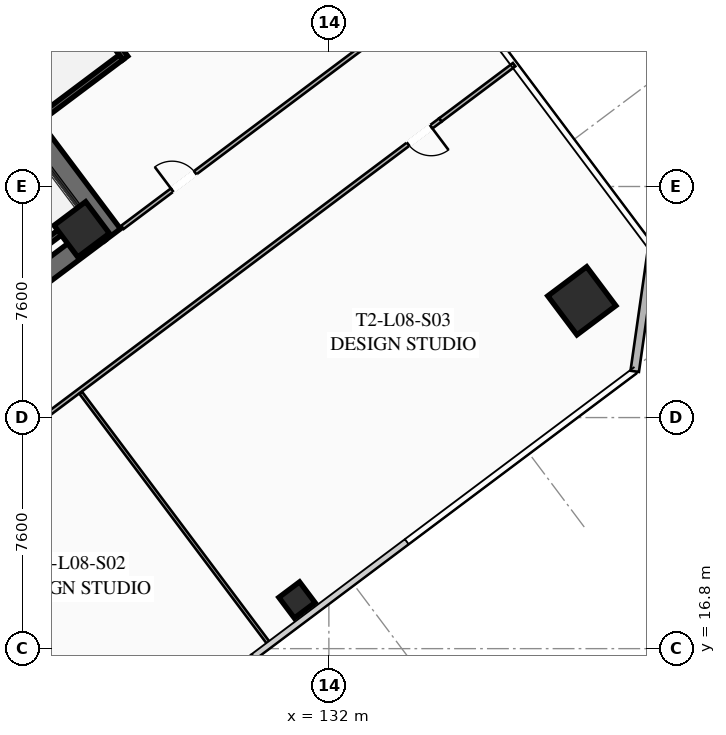
"""IFC4 building model, lengths in metres.
Left out: names, types, materials, properties, quantities, classifications, styles, units other than length and angle.
Written with IfcOpenShell. Run it as: python <this file> out.ifc"""

import sys

from ifc_helpers import new_model, si_unit, direction, frame, frame_2d, origin, origin_2d, place, context, subcontext, project, spatial, rectangle, hollow_rectangle, extrude, element, fill, save


model = new_model("IFC4")
c1 = context("Model", 3, precision=1e-05, world=origin(), true_north=direction((0.0, 1.0)))
c2 = subcontext(c1, "Body", "Model", "MODEL_VIEW")
j1 = project(units=[si_unit("LENGTHUNIT", "METRE"), si_unit("PLANEANGLEUNIT", "RADIAN")], contexts=[c1])
p1 = place(None, origin())
s1 = spatial("IfcSite", under=j1, at=p1, CompositionType="ELEMENT")
p2 = place(p1, origin())
s2 = spatial("IfcBuilding", under=s1, at=p2, CompositionType="ELEMENT")
p3 = place(p2, frame((0.0, 0.0, 35.25)))
s3 = spatial("IfcBuildingStorey", under=s2, at=p3, CompositionType="ELEMENT", Elevation=35.25)
p4 = place(p3, frame((115.524, 42.893, 0.0), z_axis=(0.0, 0.0, 1.0), x_axis=(0.600005007985, -0.799996243986, 0.0)))
e1 = element("IfcWall", 1, at=p4, inside=s3, PredefinedType="SHEAR", context=c2, shape_type="SweptSolid", body=[
    extrude(rectangle(XDim=15.6, YDim=0.65, at=frame_2d((7.8, 0.0))), origin(), (0.0, 0.0, 1.0), 3.55),
])
p5 = place(p3, frame((124.429, 30.478, 0.0), z_axis=(0.0, 0.0, 1.0), x_axis=(-0.799998028465, -0.600002628705, 0.0)))
e2 = element("IfcWall", 2, at=p5, inside=s3, PredefinedType="SHEAR", context=c2, shape_type="SweptSolid", body=[
    extrude(rectangle(XDim=14.86, YDim=0.65, at=frame_2d((7.43, 0.0))), origin(), (0.0, 0.0, 1.0), 3.55),
])
p6 = place(p5, frame((9.13, 0.0, 0.0)))
e3 = element("IfcOpeningElement", 3, at=p6, cuts=e2, PredefinedType="OPENING", context=c2, shape_type="SweptSolid", body=[
    extrude(rectangle(XDim=1.25, YDim=2.25, at=frame_2d((0.625, 1.125))), frame((0.0, 0.335, 0.0), z_axis=(0.0, -1.0, 0.0), x_axis=(1.0, 0.0, 0.0)), (0.0, 0.0, 1.0), 0.67),
])
p7 = place(p5, frame((4.08, 0.0, 0.0)))
e4 = element("IfcOpeningElement", 4, at=p7, cuts=e2, PredefinedType="OPENING", context=c2, shape_type="SweptSolid", body=[
    extrude(rectangle(XDim=1.25, YDim=2.25, at=frame_2d((0.625, 1.125))), frame((0.0, 0.335, 0.0), z_axis=(0.0, -1.0, 0.0), x_axis=(1.0, 0.0, 0.0)), (0.0, 0.0, 1.0), 0.67),
])
p8 = place(p3, frame((123.87, 30.59, 0.0), z_axis=(0.0, 0.0, 1.0), x_axis=(0.799999996291, 0.600000004945, 0.0)))
e5 = element("IfcColumn", 5, at=p8, inside=s3, PredefinedType="COLUMN", context=c2, shape_type="SweptSolid", body=[
    extrude(hollow_rectangle(XDim=1.3, YDim=1.3, WallThickness=0.05, at=origin_2d()), origin(), (0.0, 0.0, 1.0), 3.35),
])
p9 = place(p3, frame((140.32, 28.24, 0.0), z_axis=(0.0, 0.0, 1.0), x_axis=(0.799999996291, 0.600000004945, 0.0)))
e6 = element("IfcColumn", 6, at=p9, inside=s3, PredefinedType="COLUMN", context=c2, shape_type="SweptSolid", body=[
    extrude(hollow_rectangle(XDim=1.6, YDim=1.6, WallThickness=0.06, at=origin_2d()), origin(), (0.0, 0.0, 1.0), 3.35),
])
p10 = place(p3, frame((130.95, 18.4, 0.0), z_axis=(0.0, 0.0, 1.0), x_axis=(0.799999996291, 0.600000004945, 0.0)))
e7 = element("IfcColumn", 7, at=p10, inside=s3, PredefinedType="COLUMN", context=c2, shape_type="SweptSolid", body=[
    extrude(hollow_rectangle(XDim=0.85, YDim=0.85, WallThickness=0.035, at=origin_2d()), origin(), (0.0, 0.0, 1.0), 3.35),
])
p11 = place(p3, frame((142.64, 29.98, 0.0), z_axis=(0.0, 0.0, 1.0), x_axis=(-0.14137968631, -0.989955445613, 0.0)))
e8 = element("IfcWall", 8, at=p11, inside=s3, PredefinedType="SOLIDWALL", context=c2, shape_type="SweptSolid", body=[
    extrude(rectangle(XDim=4.101, YDim=0.28, at=frame_2d((2.051, 0.0))), origin(), (0.0, 0.0, 1.0), 3.35),
])
p12 = place(p3, frame((120.98, 28.86, 0.0), z_axis=(0.0, 0.0, 1.0), x_axis=(0.800039270442, 0.59994763584, 0.0)))
e9 = element("IfcWall", 9, at=p12, inside=s3, PredefinedType="SHEAR", context=c2, shape_type="SweptSolid", body=[
    extrude(rectangle(XDim=3.73, YDim=0.2, at=frame_2d((1.865, 0.0))), origin(), (0.0, 0.0, 1.0), 3.35),
])
p13 = place(p3, frame((125.304, 36.228, 0.0), z_axis=(0.0, 0.0, 1.0), x_axis=(-0.59998851072, 0.800008616831, 0.0)))
e10 = element("IfcWall", 10, at=p13, inside=s3, PredefinedType="SHEAR", context=c2, shape_type="SweptSolid", body=[
    extrude(rectangle(XDim=6.8, YDim=0.2, at=frame_2d((3.4, 0.0))), origin(), (0.0, 0.0, 1.0), 3.35),
])
p14 = place(p3, frame((122.444, 34.208, 0.0), z_axis=(0.0, 0.0, 1.0), x_axis=(0.79999138319, 0.600011488909, 0.0)))
e11 = element("IfcWall", 11, at=p14, inside=s3, PredefinedType="SHEAR", context=c2, shape_type="SweptSolid", body=[
    extrude(rectangle(XDim=3.4, YDim=0.2, at=frame_2d((1.7, 0.0))), origin(), (0.0, 0.0, 1.0), 3.35),
])
p15 = place(p3, frame((135.67, 34.19, 0.0), z_axis=(0.0, 0.0, 1.0), x_axis=(-0.800000982127, -0.599998690494, 0.0)))
e12 = element("IfcWall", 12, at=p15, inside=s3, PredefinedType="PARTITIONING", context=c2, shape_type="SweptSolid", body=[
    extrude(rectangle(XDim=29.83, YDim=0.135, at=frame_2d((14.915, 0.0))), origin(), (0.0, 0.0, 1.0), 2.703),
])
p16 = place(p15, frame((28.5, 0.0, 0.0)))
e13 = element("IfcOpeningElement", 13, at=p16, cuts=e12, PredefinedType="OPENING", context=c2, shape_type="SweptSolid", body=[
    extrude(rectangle(XDim=0.95, YDim=2.05, at=frame_2d((0.475, 1.025))), frame((0.0, 0.077, 0.0), z_axis=(0.0, -1.0, 0.0), x_axis=(1.0, 0.0, 0.0)), (0.0, 0.0, 1.0), 0.155),
])
p17 = place(p15, frame((18.075, 0.0, 0.0)))
e14 = element("IfcOpeningElement", 14, at=p17, cuts=e12, PredefinedType="OPENING", context=c2, shape_type="SweptSolid", body=[
    extrude(rectangle(XDim=0.95, YDim=2.05, at=frame_2d((0.475, 1.025))), frame((0.0, 0.077, 0.0), z_axis=(0.0, -1.0, 0.0), x_axis=(1.0, 0.0, 0.0)), (0.0, 0.0, 1.0), 0.155),
])
p18 = place(p15, frame((0.38, 0.0, 0.0)))
e15 = element("IfcOpeningElement", 15, at=p18, cuts=e12, PredefinedType="OPENING", context=c2, shape_type="SweptSolid", body=[
    extrude(rectangle(XDim=0.95, YDim=2.05, at=frame_2d((0.475, 1.025))), frame((0.0, 0.077, 0.0), z_axis=(0.0, -1.0, 0.0), x_axis=(1.0, 0.0, 0.0)), (0.0, 0.0, 1.0), 0.155),
])
p19 = place(p3, frame((135.67, 34.19, 0.0), z_axis=(0.0, 0.0, 1.0), x_axis=(0.799990331366, 0.600012891296, 0.0)))
e16 = element("IfcWall", 16, at=p19, inside=s3, PredefinedType="PARTITIONING", context=c2, shape_type="SweptSolid", body=[
    extrude(rectangle(XDim=3.03, YDim=0.135, at=frame_2d((1.515, 0.0))), origin(), (0.0, 0.0, 1.0), 2.703),
])
p20 = place(p3, frame((124.128, 12.496, 0.0), z_axis=(0.0, 0.0, 1.0), x_axis=(-0.600007548425, 0.799994338626, 0.0)))
e17 = element("IfcWall", 17, at=p20, inside=s3, PredefinedType="PARTITIONING", context=c2, shape_type="SweptSolid", body=[
    extrude(rectangle(XDim=10.35, YDim=0.11, at=frame_2d((5.175, 0.0))), origin(), (0.0, 0.0, 1.0), 2.703),
])
p21 = place(p3, frame((130.048, 16.936, 0.0), z_axis=(0.0, 0.0, 1.0), x_axis=(-0.600011322243, 0.799991508192, 0.0)))
e18 = element("IfcWall", 18, at=p21, inside=s3, PredefinedType="PARTITIONING", context=c2, shape_type="SweptSolid", body=[
    extrude(rectangle(XDim=10.35, YDim=0.11, at=frame_2d((5.175, 0.0))), origin(), (0.0, 0.0, 1.0), 2.703),
])
p22 = place(p3, frame((125.208, 30.656, 0.0), z_axis=(0.0, 0.0, 1.0), x_axis=(0.799995666112, 0.600005778473, 0.0)))
e19 = element("IfcWall", 19, at=p22, inside=s3, PredefinedType="PARTITIONING", context=c2, shape_type="SweptSolid", body=[
    extrude(rectangle(XDim=13.52, YDim=0.135, at=frame_2d((6.76, 0.0))), origin(), (0.0, 0.0, 1.0), 2.703),
])
p23 = place(p22, frame((2.045, 0.0, 0.0)))
e20 = element("IfcOpeningElement", 20, at=p23, cuts=e19, PredefinedType="OPENING", context=c2, shape_type="SweptSolid", body=[
    extrude(rectangle(XDim=0.95, YDim=2.05, at=frame_2d((0.475, 1.025))), frame((0.0, 0.077, 0.0), z_axis=(0.0, -1.0, 0.0), x_axis=(1.0, 0.0, 0.0)), (0.0, 0.0, 1.0), 0.155),
])
p24 = place(p18, origin())
e21 = element("IfcDoor", 21, at=p24, inside=s3, OperationType="SINGLE_SWING_LEFT", PredefinedType="DOOR", context=c2, shape_type="SweptSolid", body=[
    extrude(rectangle(XDim=0.95, YDim=2.05, at=frame_2d((0.475, 1.025))), frame((0.0, 0.025, 0.0), z_axis=(0.0, -1.0, 0.0), x_axis=(1.0, 0.0, 0.0)), (0.0, 0.0, 1.0), 0.05),
])
fill(e15, e21)
p25 = place(p23, origin())
e22 = element("IfcDoor", 22, at=p25, inside=s3, OperationType="SINGLE_SWING_LEFT", PredefinedType="DOOR", context=c2, shape_type="SweptSolid", body=[
    extrude(rectangle(XDim=0.95, YDim=2.05, at=frame_2d((0.475, 1.025))), frame((0.0, 0.025, 0.0), z_axis=(0.0, -1.0, 0.0), x_axis=(1.0, 0.0, 0.0)), (0.0, 0.0, 1.0), 0.05),
])
fill(e20, e22)
save(model, sys.argv[1])
